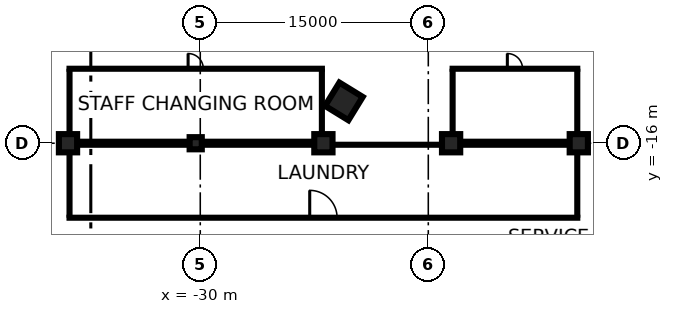
"""IFC4 building model, lengths in metres.
Left out: names, types, materials, properties, quantities, classifications, styles, units other than length and angle.
Written with IfcOpenShell. Run it as: python <this file> out.ifc"""

import sys

from ifc_helpers import new_model, si_unit, direction, frame, frame_2d, origin, origin_2d, place, context, subcontext, project, spatial, rectangle, extrude, element, fill, save


model = new_model("IFC4")
c1 = context("Model", 3, precision=1e-05, world=origin(), true_north=direction((0.0, 1.0)))
c2 = subcontext(c1, "Body", "Model", "MODEL_VIEW")
j1 = project(units=[si_unit("LENGTHUNIT", "METRE"), si_unit("PLANEANGLEUNIT", "RADIAN")], contexts=[c1])
p1 = place(None, origin())
s1 = spatial("IfcSite", under=j1, at=p1, CompositionType="ELEMENT")
p2 = place(p1, origin())
s2 = spatial("IfcBuilding", under=s1, at=p2, CompositionType="ELEMENT")
p3 = place(p2, frame((0.0, 0.0, -3.6)))
s3 = spatial("IfcBuildingStorey", under=s2, at=p3, CompositionType="ELEMENT", Elevation=-3.6)
p4 = place(p3, frame((-20.552, -13.248, -0.4), z_axis=(0.0, 0.0, 1.0), x_axis=(0.523429826947, 0.85206878611, 0.0)))
e1 = element("IfcColumn", 1, at=p4, inside=s3, PredefinedType="COLUMN", context=c2, shape_type="SweptSolid", body=[
    extrude(rectangle(XDim=1.8, YDim=1.8, at=origin_2d()), origin(), (0.0, 0.0, 1.0), 3.55),
])
p5 = place(p3, frame((-38.7, -16.0, -0.4), z_axis=(0.0, 0.0, 1.0), x_axis=(1.0, 0.0, 0.0)))
e2 = element("IfcColumn", 2, at=p5, inside=s3, PredefinedType="COLUMN", context=c2, shape_type="SweptSolid", body=[
    extrude(rectangle(XDim=1.2, YDim=1.2, at=origin_2d()), origin(), (0.0, 0.0, 1.0), 3.55),
])
p6 = place(p3, frame((-30.3, -16.0, -0.4), z_axis=(0.0, 0.0, 1.0), x_axis=(1.0, 0.0, 0.0)))
e3 = element("IfcColumn", 3, at=p6, inside=s3, PredefinedType="COLUMN", context=c2, shape_type="SweptSolid", body=[
    extrude(rectangle(XDim=0.8, YDim=0.8, at=origin_2d()), origin(), (0.0, 0.0, 1.0), 3.55),
])
for number, where, z_axis, x_axis in (
    (4, (-21.9, -16.0, -0.4), (0.0, 0.0, 1.0), (1.0, 0.0, 0.0)),
    (5, (-13.5, -16.0, -0.4), (0.0, 0.0, 1.0), (1.0, 0.0, 0.0)),
    (6, (-5.1, -16.0, -0.4), (0.0, 0.0, 1.0), (1.0, 0.0, 0.0)),
):
    element("IfcColumn", number, at=place(p3, frame(where, z_axis=z_axis, x_axis=x_axis)), inside=s3, PredefinedType="COLUMN", context=c2, shape_type="SweptSolid", body=[
        extrude(rectangle(XDim=1.2, YDim=1.2, at=origin_2d()), origin(), (0.0, 0.0, 1.0), 3.55),
    ])
p7 = place(p3, frame((-38.7, -20.9, 0.0), z_axis=(0.0, 0.0, 1.0), x_axis=(1.0, 0.0, 0.0)))
e7 = element("IfcWall", 7, at=p7, inside=s3, PredefinedType="PARTITIONING", context=c2, shape_type="SweptSolid", body=[
    extrude(rectangle(XDim=33.6, YDim=0.2, at=frame_2d((16.8, 0.0))), origin(), (0.0, 0.0, 1.0), 3.15),
])
p8 = place(p7, frame((15.9, 0.0, 0.0)))
e8 = element("IfcOpeningElement", 8, at=p8, cuts=e7, PredefinedType="OPENING", context=c2, shape_type="SweptSolid", body=[
    extrude(rectangle(XDim=1.8, YDim=2.1, at=frame_2d((0.9, 1.05))), frame((0.0, 0.11, 0.0), z_axis=(0.0, -1.0, 0.0), x_axis=(1.0, 0.0, 0.0)), (0.0, 0.0, 1.0), 0.22),
])
p9 = place(p3, frame((-38.7, -16.1, 0.0), z_axis=(0.0, 0.0, 1.0), x_axis=(1.0, 0.0, 0.0)))
e9 = element("IfcWall", 9, at=p9, inside=s3, PredefinedType="PARTITIONING", context=c2, shape_type="SweptSolid", body=[
    extrude(rectangle(XDim=33.6, YDim=0.2, at=frame_2d((16.8, 0.0))), origin(), (0.0, 0.0, 1.0), 3.15),
])
for number, where, z_axis, x_axis in (
    (10, (-38.6, -20.8, 0.0), (0.0, 0.0, 1.0), (0.0, 1.0, 0.0)),
    (11, (-5.2, -20.8, 0.0), (0.0, 0.0, 1.0), (0.0, 1.0, 0.0)),
):
    element("IfcWall", number, at=place(p3, frame(where, z_axis=z_axis, x_axis=x_axis)), inside=s3, PredefinedType="PARTITIONING", context=c2, shape_type="SweptSolid", body=[
        extrude(rectangle(XDim=4.2, YDim=0.2, at=frame_2d((2.1, 0.0))), origin(), (0.0, 0.0, 1.0), 3.15),
    ])
p10 = place(p3, frame((-38.7, -15.9, 0.0), z_axis=(0.0, 0.0, 1.0), x_axis=(1.0, 0.0, 0.0)))
e12 = element("IfcWall", 12, at=p10, inside=s3, PredefinedType="PARTITIONING", context=c2, shape_type="SweptSolid", body=[
    extrude(rectangle(XDim=16.8, YDim=0.2, at=frame_2d((8.4, 0.0))), origin(), (0.0, 0.0, 1.0), 3.15),
])
p11 = place(p3, frame((-38.7, -11.1, 0.0), z_axis=(0.0, 0.0, 1.0), x_axis=(1.0, 0.0, 0.0)))
e13 = element("IfcWall", 13, at=p11, inside=s3, PredefinedType="PARTITIONING", context=c2, shape_type="SweptSolid", body=[
    extrude(rectangle(XDim=16.8, YDim=0.2, at=frame_2d((8.4, 0.0))), origin(), (0.0, 0.0, 1.0), 3.15),
])
p12 = place(p11, frame((7.9, 0.0, 0.0)))
e14 = element("IfcOpeningElement", 14, at=p12, cuts=e13, PredefinedType="OPENING", context=c2, shape_type="SweptSolid", body=[
    extrude(rectangle(XDim=1.0, YDim=2.1, at=frame_2d((0.5, 1.05))), frame((0.0, 0.11, 0.0), z_axis=(0.0, -1.0, 0.0), x_axis=(1.0, 0.0, 0.0)), (0.0, 0.0, 1.0), 0.22),
])
for number, where, z_axis, x_axis in (
    (15, (-38.6, -15.4, 0.0), (0.0, 0.0, 1.0), (0.0, 1.0, 0.0)),
    (16, (-22.0, -15.4, 0.0), (0.0, 0.0, 1.0), (0.0, 1.0, 0.0)),
):
    element("IfcWall", number, at=place(p3, frame(where, z_axis=z_axis, x_axis=x_axis)), inside=s3, PredefinedType="PARTITIONING", context=c2, shape_type="SweptSolid", body=[
        extrude(rectangle(XDim=4.2, YDim=0.2, at=frame_2d((2.1, 0.0))), origin(), (0.0, 0.0, 1.0), 3.15),
    ])
p13 = place(p3, frame((-13.5, -15.9, 0.0), z_axis=(0.0, 0.0, 1.0), x_axis=(1.0, 0.0, 0.0)))
e17 = element("IfcWall", 17, at=p13, inside=s3, PredefinedType="PARTITIONING", context=c2, shape_type="SweptSolid", body=[
    extrude(rectangle(XDim=8.4, YDim=0.2, at=frame_2d((4.2, 0.0))), origin(), (0.0, 0.0, 1.0), 3.15),
])
p14 = place(p3, frame((-13.5, -11.1, 0.0), z_axis=(0.0, 0.0, 1.0), x_axis=(1.0, 0.0, 0.0)))
e18 = element("IfcWall", 18, at=p14, inside=s3, PredefinedType="PARTITIONING", context=c2, shape_type="SweptSolid", body=[
    extrude(rectangle(XDim=8.4, YDim=0.2, at=frame_2d((4.2, 0.0))), origin(), (0.0, 0.0, 1.0), 3.15),
])
p15 = place(p14, frame((3.7, 0.0, 0.0)))
e19 = element("IfcOpeningElement", 19, at=p15, cuts=e18, PredefinedType="OPENING", context=c2, shape_type="SweptSolid", body=[
    extrude(rectangle(XDim=1.0, YDim=2.1, at=frame_2d((0.5, 1.05))), frame((0.0, 0.11, 0.0), z_axis=(0.0, -1.0, 0.0), x_axis=(1.0, 0.0, 0.0)), (0.0, 0.0, 1.0), 0.22),
])
for number, where, z_axis, x_axis in (
    (20, (-13.4, -15.4, 0.0), (0.0, 0.0, 1.0), (0.0, 1.0, 0.0)),
    (21, (-5.2, -15.4, 0.0), (0.0, 0.0, 1.0), (0.0, 1.0, 0.0)),
):
    element("IfcWall", number, at=place(p3, frame(where, z_axis=z_axis, x_axis=x_axis)), inside=s3, PredefinedType="PARTITIONING", context=c2, shape_type="SweptSolid", body=[
        extrude(rectangle(XDim=4.2, YDim=0.2, at=frame_2d((2.1, 0.0))), origin(), (0.0, 0.0, 1.0), 3.15),
    ])
p16 = place(p8, origin())
e22 = element("IfcDoor", 22, at=p16, inside=s3, OperationType="DOUBLE_DOOR_SINGLE_SWING", PredefinedType="DOOR", context=c2, shape_type="SweptSolid", body=[
    extrude(rectangle(XDim=1.8, YDim=2.1, at=frame_2d((0.9, 1.05))), frame((0.0, 0.025, 0.0), z_axis=(0.0, -1.0, 0.0), x_axis=(1.0, 0.0, 0.0)), (0.0, 0.0, 1.0), 0.05),
])
fill(e8, e22)
p17 = place(p12, origin())
e23 = element("IfcDoor", 23, at=p17, inside=s3, OperationType="SINGLE_SWING_LEFT", PredefinedType="DOOR", context=c2, shape_type="SweptSolid", body=[
    extrude(rectangle(XDim=1.0, YDim=2.1, at=frame_2d((0.5, 1.05))), frame((0.0, 0.025, 0.0), z_axis=(0.0, -1.0, 0.0), x_axis=(1.0, 0.0, 0.0)), (0.0, 0.0, 1.0), 0.05),
])
fill(e14, e23)
p18 = place(p15, origin())
e24 = element("IfcDoor", 24, at=p18, inside=s3, OperationType="SINGLE_SWING_LEFT", PredefinedType="DOOR", context=c2, shape_type="SweptSolid", body=[
    extrude(rectangle(XDim=1.0, YDim=2.1, at=frame_2d((0.5, 1.05))), frame((0.0, 0.025, 0.0), z_axis=(0.0, -1.0, 0.0), x_axis=(1.0, 0.0, 0.0)), (0.0, 0.0, 1.0), 0.05),
])
fill(e19, e24)
save(model, sys.argv[1])
